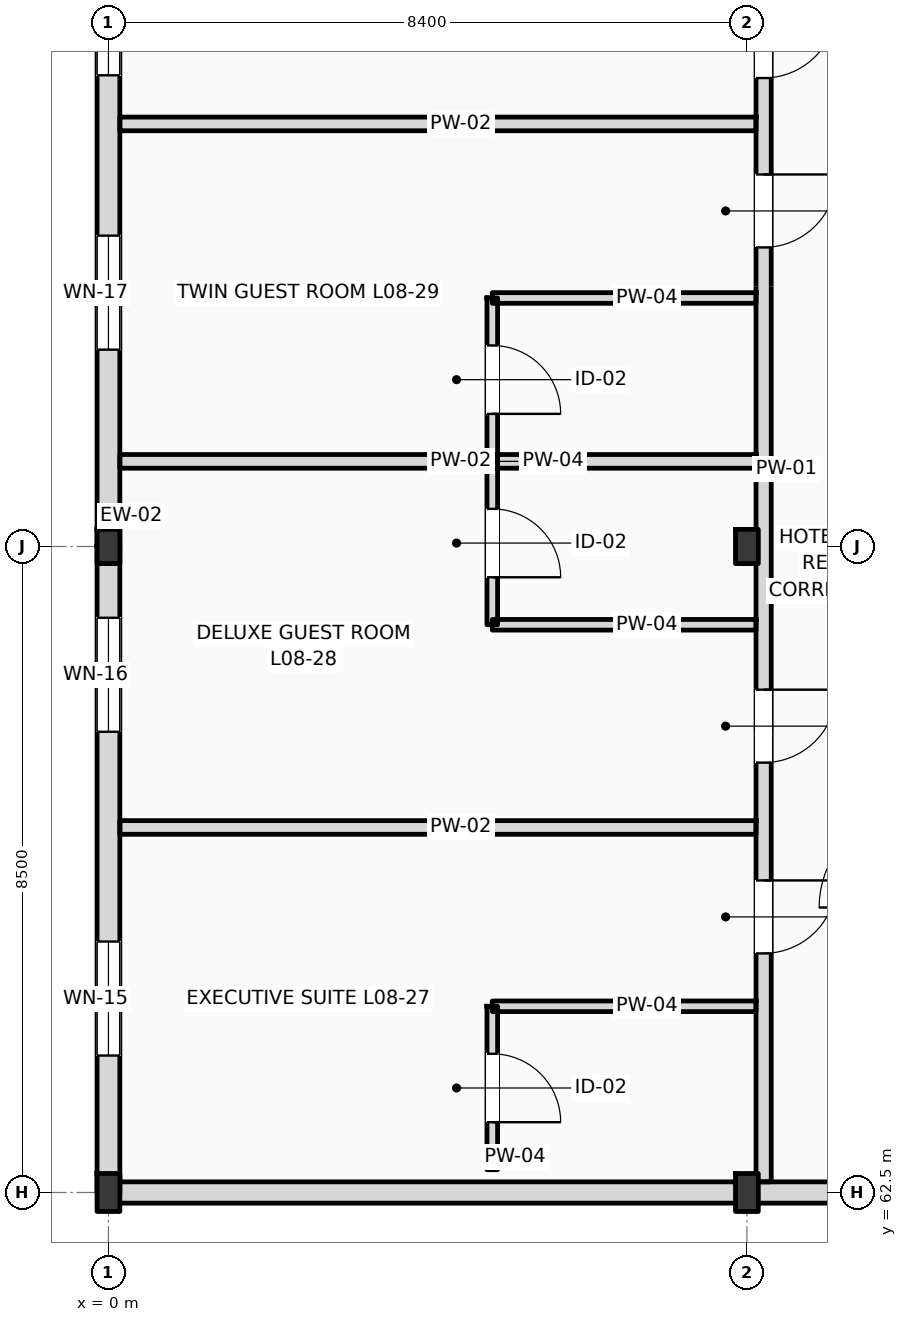
"""IFC4 building model, lengths in metres.
Left out: names, types, materials, properties, quantities, classifications, styles, units other than length and angle.
Written with IfcOpenShell. Run it as: python <this file> out.ifc"""

import sys

from ifc_helpers import new_model, si_unit, direction, frame, frame_2d, origin, origin_2d, place, context, subcontext, project, spatial, rectangle, i_section, extrude, element, fill, save


model = new_model("IFC4")
c1 = context("Model", 3, precision=1e-05, world=origin(), true_north=direction((0.0, 1.0)))
c2 = subcontext(c1, "Body", "Model", "MODEL_VIEW")
j1 = project(units=[si_unit("LENGTHUNIT", "METRE"), si_unit("PLANEANGLEUNIT", "RADIAN")], contexts=[c1])
p1 = place(None, origin())
s1 = spatial("IfcSite", under=j1, at=p1, CompositionType="ELEMENT")
p2 = place(p1, origin())
s2 = spatial("IfcBuilding", under=s1, at=p2, CompositionType="ELEMENT")
p3 = place(p2, frame((0.0, 0.0, 35.4)))
s3 = spatial("IfcBuildingStorey", under=s2, at=p3, CompositionType="ELEMENT", Elevation=35.4)
p4 = place(p3, frame((0.0, 62.5, 0.0), z_axis=(0.0, 0.0, 1.0), x_axis=(1.0, 0.0, 0.0)))
e1 = element("IfcColumn", 1, at=p4, inside=s3, PredefinedType="COLUMN", context=c2, shape_type="SweptSolid", body=[
    extrude(i_section(OverallWidth=0.3, OverallDepth=0.5, WebThickness=0.014, FlangeThickness=0.028, FilletRadius=0.027, at=origin_2d()), origin(), (0.0, 0.0, 1.0), 3.6),
])
p5 = place(p3, frame((0.0, 71.0, 0.0), z_axis=(0.0, 0.0, 1.0), x_axis=(1.0, 0.0, 0.0)))
e2 = element("IfcColumn", 2, at=p5, inside=s3, PredefinedType="COLUMN", context=c2, shape_type="SweptSolid", body=[
    extrude(i_section(OverallWidth=0.3, OverallDepth=0.45, WebThickness=0.014, FlangeThickness=0.026, FilletRadius=0.027, at=origin_2d()), origin(), (0.0, 0.0, 1.0), 3.6),
])
p6 = place(p3, frame((8.4, 62.5, 0.0), z_axis=(0.0, 0.0, 1.0), x_axis=(1.0, 0.0, 0.0)))
e3 = element("IfcColumn", 3, at=p6, inside=s3, PredefinedType="COLUMN", context=c2, shape_type="SweptSolid", body=[
    extrude(i_section(OverallWidth=0.3, OverallDepth=0.5, WebThickness=0.014, FlangeThickness=0.028, FilletRadius=0.027, at=origin_2d()), origin(), (0.0, 0.0, 1.0), 3.6),
])
p7 = place(p3, frame((8.4, 71.0, 0.0), z_axis=(0.0, 0.0, 1.0), x_axis=(1.0, 0.0, 0.0)))
e4 = element("IfcColumn", 4, at=p7, inside=s3, PredefinedType="COLUMN", context=c2, shape_type="SweptSolid", body=[
    extrude(i_section(OverallWidth=0.3, OverallDepth=0.45, WebThickness=0.014, FlangeThickness=0.026, FilletRadius=0.027, at=origin_2d()), origin(), (0.0, 0.0, 1.0), 3.6),
])
p8 = place(p3, frame((0.0, 62.5, 0.0), z_axis=(0.0, 0.0, 1.0), x_axis=(0.0, 1.0, 0.0)))
e5 = element("IfcWall", 5, at=p8, inside=s3, PredefinedType="STANDARD", context=c2, shape_type="SweptSolid", body=[
    extrude(rectangle(XDim=8.5, YDim=0.3, at=frame_2d((4.25, 0.0))), origin(), (0.0, 0.0, 1.0), 3.01),
])
p9 = place(p8, frame((1.802, 0.0, 0.9)))
e6 = element("IfcOpeningElement", 6, at=p9, cuts=e5, PredefinedType="OPENING", context=c2, shape_type="SweptSolid", body=[
    extrude(rectangle(XDim=1.5, YDim=1.93, at=frame_2d((0.75, 0.965))), frame((0.0, 0.16, 0.0), z_axis=(0.0, -1.0, 0.0), x_axis=(1.0, 0.0, 0.0)), (0.0, 0.0, 1.0), 0.32),
])
p10 = place(p8, frame((6.062, 0.0, 0.9)))
e7 = element("IfcOpeningElement", 7, at=p10, cuts=e5, PredefinedType="OPENING", context=c2, shape_type="SweptSolid", body=[
    extrude(rectangle(XDim=1.5, YDim=1.93, at=frame_2d((0.75, 0.965))), frame((0.0, 0.16, 0.0), z_axis=(0.0, -1.0, 0.0), x_axis=(1.0, 0.0, 0.0)), (0.0, 0.0, 1.0), 0.32),
])
p11 = place(p3, frame((0.0, 71.0, 0.0), z_axis=(0.0, 0.0, 1.0), x_axis=(0.0, 1.0, 0.0)))
e8 = element("IfcWall", 8, at=p11, inside=s3, PredefinedType="STANDARD", context=c2, shape_type="SweptSolid", body=[
    extrude(rectangle(XDim=8.5, YDim=0.3, at=frame_2d((4.25, 0.0))), origin(), (0.0, 0.0, 1.0), 3.01),
])
p12 = place(p11, frame((2.59, 0.0, 0.9)))
e9 = element("IfcOpeningElement", 9, at=p12, cuts=e8, PredefinedType="OPENING", context=c2, shape_type="SweptSolid", body=[
    extrude(rectangle(XDim=1.5, YDim=1.93, at=frame_2d((0.75, 0.965))), frame((0.0, 0.16, 0.0), z_axis=(0.0, -1.0, 0.0), x_axis=(1.0, 0.0, 0.0)), (0.0, 0.0, 1.0), 0.32),
])
p13 = place(p11, frame((6.2, 0.0, 0.9)))
e10 = element("IfcOpeningElement", 10, at=p13, cuts=e8, PredefinedType="OPENING", context=c2, shape_type="SweptSolid", body=[
    extrude(rectangle(XDim=1.5, YDim=1.93, at=frame_2d((0.75, 0.965))), frame((0.0, 0.16, 0.0), z_axis=(0.0, -1.0, 0.0), x_axis=(1.0, 0.0, 0.0)), (0.0, 0.0, 1.0), 0.32),
])
p14 = place(p3, frame((0.0, 62.5, 0.0), z_axis=(0.0, 0.0, 1.0), x_axis=(1.0, 0.0, 0.0)))
e11 = element("IfcWall", 11, at=p14, inside=s3, PredefinedType="STANDARD", context=c2, shape_type="SweptSolid", body=[
    extrude(rectangle(XDim=25.2, YDim=0.28, at=frame_2d((12.6, 0.0))), origin(), (0.0, 0.0, 1.0), 2.82),
])
p15 = place(p3, frame((8.62, 62.64, 0.0), z_axis=(0.0, 0.0, 1.0), x_axis=(0.0, 1.0, 0.0)))
e12 = element("IfcWall", 12, at=p15, inside=s3, PredefinedType="PARTITIONING", context=c2, shape_type="SweptSolid", body=[
    extrude(rectangle(XDim=32.66, YDim=0.2, at=frame_2d((16.33, 0.0))), origin(), (0.0, 0.0, 1.0), 3.01),
])
p16 = place(p15, frame((3.006, 0.0, 0.0)))
e13 = element("IfcOpeningElement", 13, at=p16, cuts=e12, PredefinedType="OPENING", context=c2, shape_type="SweptSolid", body=[
    extrude(rectangle(XDim=0.96, YDim=2.2, at=frame_2d((0.48, 1.1))), frame((0.0, 0.11, 0.0), z_axis=(0.0, -1.0, 0.0), x_axis=(1.0, 0.0, 0.0)), (0.0, 0.0, 1.0), 0.22),
])
p17 = place(p15, frame((5.516, 0.0, 0.0)))
e14 = element("IfcOpeningElement", 14, at=p17, cuts=e12, PredefinedType="OPENING", context=c2, shape_type="SweptSolid", body=[
    extrude(rectangle(XDim=0.96, YDim=2.2, at=frame_2d((0.48, 1.1))), frame((0.0, 0.11, 0.0), z_axis=(0.0, -1.0, 0.0), x_axis=(1.0, 0.0, 0.0)), (0.0, 0.0, 1.0), 0.22),
])
p18 = place(p15, frame((12.295, 0.0, 0.0)))
e15 = element("IfcOpeningElement", 15, at=p18, cuts=e12, PredefinedType="OPENING", context=c2, shape_type="SweptSolid", body=[
    extrude(rectangle(XDim=0.96, YDim=2.2, at=frame_2d((0.48, 1.1))), frame((0.0, 0.11, 0.0), z_axis=(0.0, -1.0, 0.0), x_axis=(1.0, 0.0, 0.0)), (0.0, 0.0, 1.0), 0.22),
])
p19 = place(p15, frame((14.524, 0.0, 0.0)))
e16 = element("IfcOpeningElement", 16, at=p19, cuts=e12, PredefinedType="OPENING", context=c2, shape_type="SweptSolid", body=[
    extrude(rectangle(XDim=0.96, YDim=2.2, at=frame_2d((0.48, 1.1))), frame((0.0, 0.11, 0.0), z_axis=(0.0, -1.0, 0.0), x_axis=(1.0, 0.0, 0.0)), (0.0, 0.0, 1.0), 0.22),
])
p20 = place(p15, frame((21.552, 0.0, 0.0)))
e17 = element("IfcOpeningElement", 17, at=p20, cuts=e12, PredefinedType="OPENING", context=c2, shape_type="SweptSolid", body=[
    extrude(rectangle(XDim=0.96, YDim=2.2, at=frame_2d((0.48, 1.1))), frame((0.0, 0.11, 0.0), z_axis=(0.0, -1.0, 0.0), x_axis=(1.0, 0.0, 0.0)), (0.0, 0.0, 1.0), 0.22),
])
p21 = place(p15, frame((26.68, 0.0, 0.0)))
e18 = element("IfcOpeningElement", 18, at=p21, cuts=e12, PredefinedType="OPENING", context=c2, shape_type="SweptSolid", body=[
    extrude(rectangle(XDim=0.96, YDim=2.2, at=frame_2d((0.48, 1.1))), frame((0.0, 0.11, 0.0), z_axis=(0.0, -1.0, 0.0), x_axis=(1.0, 0.0, 0.0)), (0.0, 0.0, 1.0), 0.22),
])
p22 = place(p15, frame((30.872, 0.0, 0.0)))
e19 = element("IfcOpeningElement", 19, at=p22, cuts=e12, PredefinedType="OPENING", context=c2, shape_type="SweptSolid", body=[
    extrude(rectangle(XDim=0.96, YDim=2.2, at=frame_2d((0.48, 1.1))), frame((0.0, 0.11, 0.0), z_axis=(0.0, -1.0, 0.0), x_axis=(1.0, 0.0, 0.0)), (0.0, 0.0, 1.0), 0.22),
])
p23 = place(p3, frame((0.15, 67.303, 0.0), z_axis=(0.0, 0.0, 1.0), x_axis=(1.0, 0.0, 0.0)))
e20 = element("IfcWall", 20, at=p23, inside=s3, PredefinedType="PARTITIONING", context=c2, shape_type="SweptSolid", body=[
    extrude(rectangle(XDim=8.37, YDim=0.18, at=frame_2d((4.185, 0.0))), origin(), (0.0, 0.0, 1.0), 3.38),
])
p24 = place(p3, frame((5.05, 64.95, 0.0), z_axis=(0.0, 0.0, 1.0), x_axis=(1.0, 0.0, 0.0)))
e21 = element("IfcWall", 21, at=p24, inside=s3, PredefinedType="PARTITIONING", context=c2, shape_type="SweptSolid", body=[
    extrude(rectangle(XDim=3.47, YDim=0.14, at=frame_2d((1.735, 0.0))), origin(), (0.0, 0.0, 1.0), 3.38),
])
p25 = place(p3, frame((5.05, 62.8, 0.0), z_axis=(0.0, 0.0, 1.0), x_axis=(0.0, 1.0, 0.0)))
e22 = element("IfcWall", 22, at=p25, inside=s3, PredefinedType="PARTITIONING", context=c2, shape_type="SweptSolid", body=[
    extrude(rectangle(XDim=2.15, YDim=0.14, at=frame_2d((1.075, 0.0))), origin(), (0.0, 0.0, 1.0), 3.38),
])
p26 = place(p25, frame((0.625, 0.0, 0.0)))
e23 = element("IfcOpeningElement", 23, at=p26, cuts=e22, PredefinedType="OPENING", context=c2, shape_type="SweptSolid", body=[
    extrude(rectangle(XDim=0.9, YDim=2.1, at=frame_2d((0.45, 1.05))), frame((0.0, 0.08, 0.0), z_axis=(0.0, -1.0, 0.0), x_axis=(1.0, 0.0, 0.0)), (0.0, 0.0, 1.0), 0.16),
])
p27 = place(p3, frame((0.15, 72.12, 0.0), z_axis=(0.0, 0.0, 1.0), x_axis=(1.0, 0.0, 0.0)))
e24 = element("IfcWall", 24, at=p27, inside=s3, PredefinedType="PARTITIONING", context=c2, shape_type="SweptSolid", body=[
    extrude(rectangle(XDim=8.37, YDim=0.18, at=frame_2d((4.185, 0.0))), origin(), (0.0, 0.0, 1.0), 3.38),
])
p28 = place(p3, frame((5.05, 69.97, 0.0), z_axis=(0.0, 0.0, 1.0), x_axis=(1.0, 0.0, 0.0)))
e25 = element("IfcWall", 25, at=p28, inside=s3, PredefinedType="PARTITIONING", context=c2, shape_type="SweptSolid", body=[
    extrude(rectangle(XDim=3.47, YDim=0.14, at=frame_2d((1.735, 0.0))), origin(), (0.0, 0.0, 1.0), 3.38),
])
p29 = place(p3, frame((5.05, 69.97, 0.0), z_axis=(0.0, 0.0, 1.0), x_axis=(0.0, 1.0, 0.0)))
e26 = element("IfcWall", 26, at=p29, inside=s3, PredefinedType="PARTITIONING", context=c2, shape_type="SweptSolid", body=[
    extrude(rectangle(XDim=2.15, YDim=0.14, at=frame_2d((1.075, 0.0))), origin(), (0.0, 0.0, 1.0), 3.38),
])
p30 = place(p29, frame((0.625, 0.0, 0.0)))
e27 = element("IfcOpeningElement", 27, at=p30, cuts=e26, PredefinedType="OPENING", context=c2, shape_type="SweptSolid", body=[
    extrude(rectangle(XDim=0.9, YDim=2.1, at=frame_2d((0.45, 1.05))), frame((0.0, 0.08, 0.0), z_axis=(0.0, -1.0, 0.0), x_axis=(1.0, 0.0, 0.0)), (0.0, 0.0, 1.0), 0.16),
])
p31 = place(p3, frame((0.15, 76.56, 0.0), z_axis=(0.0, 0.0, 1.0), x_axis=(1.0, 0.0, 0.0)))
e28 = element("IfcWall", 28, at=p31, inside=s3, PredefinedType="PARTITIONING", context=c2, shape_type="SweptSolid", body=[
    extrude(rectangle(XDim=8.37, YDim=0.18, at=frame_2d((4.185, 0.0))), origin(), (0.0, 0.0, 1.0), 3.38),
])
p32 = place(p3, frame((5.05, 74.27, 0.0), z_axis=(0.0, 0.0, 1.0), x_axis=(1.0, 0.0, 0.0)))
e29 = element("IfcWall", 29, at=p32, inside=s3, PredefinedType="PARTITIONING", context=c2, shape_type="SweptSolid", body=[
    extrude(rectangle(XDim=3.47, YDim=0.14, at=frame_2d((1.735, 0.0))), origin(), (0.0, 0.0, 1.0), 3.38),
])
p33 = place(p3, frame((5.05, 72.12, 0.0), z_axis=(0.0, 0.0, 1.0), x_axis=(0.0, 1.0, 0.0)))
e30 = element("IfcWall", 30, at=p33, inside=s3, PredefinedType="PARTITIONING", context=c2, shape_type="SweptSolid", body=[
    extrude(rectangle(XDim=2.15, YDim=0.14, at=frame_2d((1.075, 0.0))), origin(), (0.0, 0.0, 1.0), 3.38),
])
p34 = place(p33, frame((0.625, 0.0, 0.0)))
e31 = element("IfcOpeningElement", 31, at=p34, cuts=e30, PredefinedType="OPENING", context=c2, shape_type="SweptSolid", body=[
    extrude(rectangle(XDim=0.9, YDim=2.1, at=frame_2d((0.45, 1.05))), frame((0.0, 0.08, 0.0), z_axis=(0.0, -1.0, 0.0), x_axis=(1.0, 0.0, 0.0)), (0.0, 0.0, 1.0), 0.16),
])
p35 = place(p9, origin())
e32 = element("IfcWindow", 32, at=p35, inside=s3, PartitioningType="DOUBLE_PANEL_VERTICAL", PredefinedType="WINDOW", context=c2, shape_type="SweptSolid", body=[
    extrude(rectangle(XDim=1.5, YDim=1.93, at=frame_2d((0.75, 0.965))), frame((0.0, 0.03, 0.0), z_axis=(0.0, -1.0, 0.0), x_axis=(1.0, 0.0, 0.0)), (0.0, 0.0, 1.0), 0.06),
])
fill(e6, e32)
p36 = place(p10, origin())
e33 = element("IfcWindow", 33, at=p36, inside=s3, PartitioningType="DOUBLE_PANEL_VERTICAL", PredefinedType="WINDOW", context=c2, shape_type="SweptSolid", body=[
    extrude(rectangle(XDim=1.5, YDim=1.93, at=frame_2d((0.75, 0.965))), frame((0.0, 0.03, 0.0), z_axis=(0.0, -1.0, 0.0), x_axis=(1.0, 0.0, 0.0)), (0.0, 0.0, 1.0), 0.06),
])
fill(e7, e33)
p37 = place(p12, origin())
e34 = element("IfcWindow", 34, at=p37, inside=s3, PartitioningType="DOUBLE_PANEL_VERTICAL", PredefinedType="WINDOW", context=c2, shape_type="SweptSolid", body=[
    extrude(rectangle(XDim=1.5, YDim=1.93, at=frame_2d((0.75, 0.965))), frame((0.0, 0.03, 0.0), z_axis=(0.0, -1.0, 0.0), x_axis=(1.0, 0.0, 0.0)), (0.0, 0.0, 1.0), 0.06),
])
fill(e9, e34)
p38 = place(p13, origin())
e35 = element("IfcWindow", 35, at=p38, inside=s3, PartitioningType="DOUBLE_PANEL_VERTICAL", PredefinedType="WINDOW", context=c2, shape_type="SweptSolid", body=[
    extrude(rectangle(XDim=1.5, YDim=1.93, at=frame_2d((0.75, 0.965))), frame((0.0, 0.03, 0.0), z_axis=(0.0, -1.0, 0.0), x_axis=(1.0, 0.0, 0.0)), (0.0, 0.0, 1.0), 0.06),
])
fill(e10, e35)
p39 = place(p16, frame((0.96, 0.0, 0.0), z_axis=(0.0, 0.0, 1.0), x_axis=(-1.0, 0.0, 0.0)))
e36 = element("IfcDoor", 36, at=p39, inside=s3, OperationType="SINGLE_SWING_RIGHT", PredefinedType="DOOR", context=c2, shape_type="SweptSolid", body=[
    extrude(rectangle(XDim=0.96, YDim=2.2, at=frame_2d((0.48, 1.1))), frame((0.0, 0.025, 0.0), z_axis=(0.0, -1.0, 0.0), x_axis=(1.0, 0.0, 0.0)), (0.0, 0.0, 1.0), 0.05),
])
fill(e13, e36)
p40 = place(p26, frame((0.9, 0.0, 0.0), z_axis=(0.0, 0.0, 1.0), x_axis=(-1.0, 0.0, 0.0)))
e37 = element("IfcDoor", 37, at=p40, inside=s3, OperationType="SINGLE_SWING_LEFT", PredefinedType="DOOR", context=c2, shape_type="SweptSolid", body=[
    extrude(rectangle(XDim=0.9, YDim=2.1, at=frame_2d((0.45, 1.05))), frame((0.0, 0.025, 0.0), z_axis=(0.0, -1.0, 0.0), x_axis=(1.0, 0.0, 0.0)), (0.0, 0.0, 1.0), 0.05),
])
fill(e23, e37)
p41 = place(p17, frame((0.96, 0.0, 0.0), z_axis=(0.0, 0.0, 1.0), x_axis=(-1.0, 0.0, 0.0)))
e38 = element("IfcDoor", 38, at=p41, inside=s3, OperationType="SINGLE_SWING_RIGHT", PredefinedType="DOOR", context=c2, shape_type="SweptSolid", body=[
    extrude(rectangle(XDim=0.96, YDim=2.2, at=frame_2d((0.48, 1.1))), frame((0.0, 0.025, 0.0), z_axis=(0.0, -1.0, 0.0), x_axis=(1.0, 0.0, 0.0)), (0.0, 0.0, 1.0), 0.05),
])
fill(e14, e38)
p42 = place(p30, frame((0.9, 0.0, 0.0), z_axis=(0.0, 0.0, 1.0), x_axis=(-1.0, 0.0, 0.0)))
e39 = element("IfcDoor", 39, at=p42, inside=s3, OperationType="SINGLE_SWING_LEFT", PredefinedType="DOOR", context=c2, shape_type="SweptSolid", body=[
    extrude(rectangle(XDim=0.9, YDim=2.1, at=frame_2d((0.45, 1.05))), frame((0.0, 0.025, 0.0), z_axis=(0.0, -1.0, 0.0), x_axis=(1.0, 0.0, 0.0)), (0.0, 0.0, 1.0), 0.05),
])
fill(e27, e39)
p43 = place(p18, frame((0.96, 0.0, 0.0), z_axis=(0.0, 0.0, 1.0), x_axis=(-1.0, 0.0, 0.0)))
e40 = element("IfcDoor", 40, at=p43, inside=s3, OperationType="SINGLE_SWING_RIGHT", PredefinedType="DOOR", context=c2, shape_type="SweptSolid", body=[
    extrude(rectangle(XDim=0.96, YDim=2.2, at=frame_2d((0.48, 1.1))), frame((0.0, 0.025, 0.0), z_axis=(0.0, -1.0, 0.0), x_axis=(1.0, 0.0, 0.0)), (0.0, 0.0, 1.0), 0.05),
])
fill(e15, e40)
p44 = place(p34, frame((0.9, 0.0, 0.0), z_axis=(0.0, 0.0, 1.0), x_axis=(-1.0, 0.0, 0.0)))
e41 = element("IfcDoor", 41, at=p44, inside=s3, OperationType="SINGLE_SWING_LEFT", PredefinedType="DOOR", context=c2, shape_type="SweptSolid", body=[
    extrude(rectangle(XDim=0.9, YDim=2.1, at=frame_2d((0.45, 1.05))), frame((0.0, 0.025, 0.0), z_axis=(0.0, -1.0, 0.0), x_axis=(1.0, 0.0, 0.0)), (0.0, 0.0, 1.0), 0.05),
])
fill(e31, e41)
p45 = place(p19, frame((0.96, 0.0, 0.0), z_axis=(0.0, 0.0, 1.0), x_axis=(-1.0, 0.0, 0.0)))
e42 = element("IfcDoor", 42, at=p45, inside=s3, OperationType="SINGLE_SWING_RIGHT", PredefinedType="DOOR", context=c2, shape_type="SweptSolid", body=[
    extrude(rectangle(XDim=0.96, YDim=2.2, at=frame_2d((0.48, 1.1))), frame((0.0, 0.025, 0.0), z_axis=(0.0, -1.0, 0.0), x_axis=(1.0, 0.0, 0.0)), (0.0, 0.0, 1.0), 0.05),
])
fill(e16, e42)
save(model, sys.argv[1])
